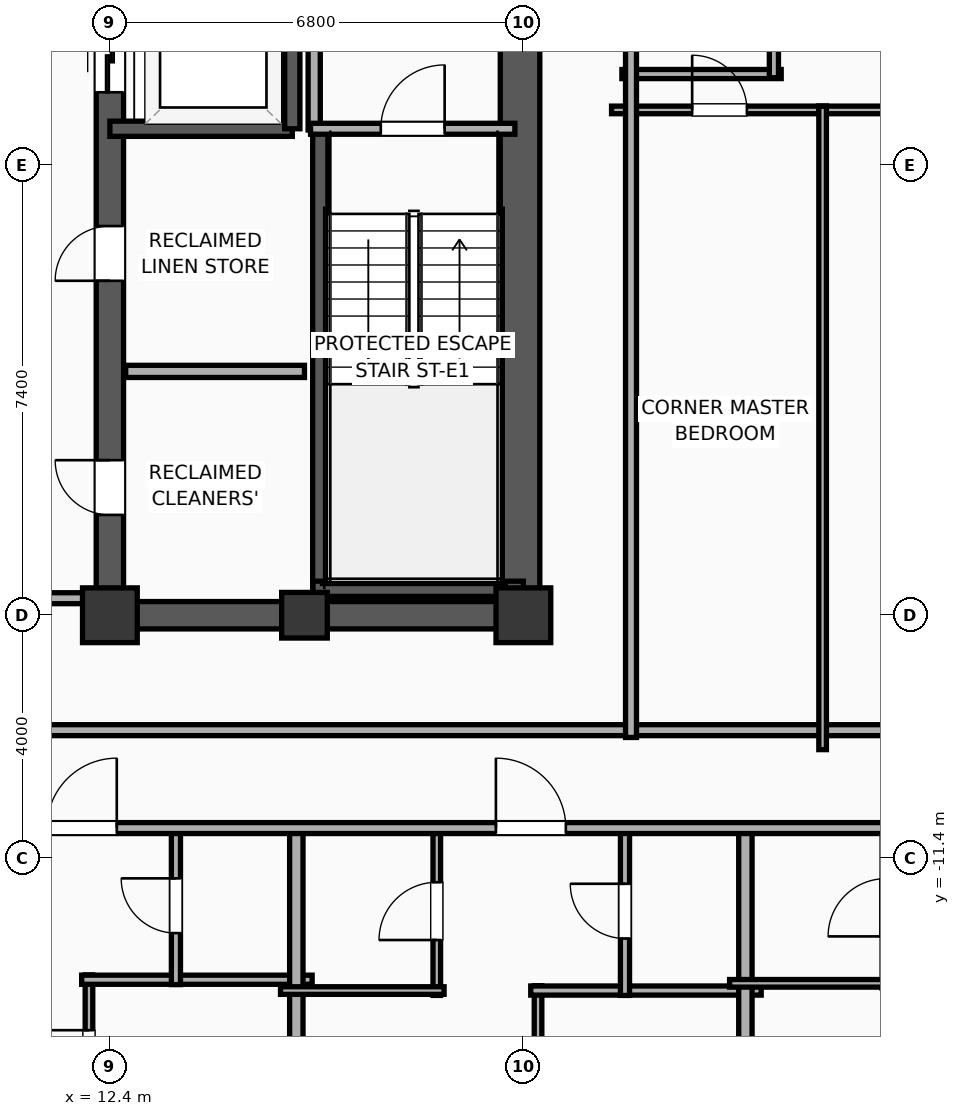
"""IFC4 building model, lengths in metres.
Left out: names, types, materials, properties, quantities, classifications, styles, units other than length and angle.
Written with IfcOpenShell. Run it as: python <this file> out.ifc"""

import sys

from ifc_helpers import new_model, si_unit, direction, frame, frame_2d, origin, origin_2d, place, context, subcontext, project, spatial, rectangle, extrude, element, fill, save


model = new_model("IFC4")
c1 = context("Model", 3, precision=1e-05, world=origin(), true_north=direction((0.0, 1.0)))
c2 = subcontext(c1, "Body", "Model", "MODEL_VIEW")
j1 = project(units=[si_unit("LENGTHUNIT", "METRE"), si_unit("PLANEANGLEUNIT", "RADIAN")], contexts=[c1])
p1 = place(None, origin())
s1 = spatial("IfcSite", under=j1, at=p1, CompositionType="ELEMENT")
p2 = place(p1, origin())
s2 = spatial("IfcBuilding", under=s1, at=p2, CompositionType="ELEMENT")
p3 = place(p2, frame((0.0, 0.0, 243.1)))
s3 = spatial("IfcBuildingStorey", under=s2, at=p3, CompositionType="ELEMENT", Elevation=243.1)
p4 = place(p3, frame((12.4, -7.4, 0.0), z_axis=(0.0, 0.0, 1.0), x_axis=(1.0, 0.0, 0.0)))
e1 = element("IfcColumn", 1, at=p4, inside=s3, PredefinedType="COLUMN", context=c2, shape_type="SweptSolid", body=[
    extrude(rectangle(XDim=0.9, YDim=0.9, at=origin_2d()), origin(), (0.0, 0.0, 1.0), 3.9),
])
p5 = place(p3, frame((15.6, -7.4, 0.0), z_axis=(0.0, 0.0, 1.0), x_axis=(1.0, 0.0, 0.0)))
e2 = element("IfcColumn", 2, at=p5, inside=s3, PredefinedType="COLUMN", context=c2, shape_type="SweptSolid", body=[
    extrude(rectangle(XDim=0.75, YDim=0.75, at=origin_2d()), origin(), (0.0, 0.0, 1.0), 3.9),
])
p6 = place(p3, frame((19.2, -7.4, 0.0), z_axis=(0.0, 0.0, 1.0), x_axis=(1.0, 0.0, 0.0)))
e3 = element("IfcColumn", 3, at=p6, inside=s3, PredefinedType="COLUMN", context=c2, shape_type="SweptSolid", body=[
    extrude(rectangle(XDim=0.9, YDim=0.9, at=origin_2d()), origin(), (0.0, 0.0, 1.0), 3.9),
])
p7 = place(p3, frame((12.175, -7.4, 0.0), z_axis=(0.0, 0.0, 1.0), x_axis=(1.0, 0.0, 0.0)))
e4 = element("IfcWall", 4, at=p7, inside=s3, PredefinedType="SHEAR", context=c2, shape_type="SweptSolid", body=[
    extrude(rectangle(XDim=7.25, YDim=0.45, at=frame_2d((3.625, 0.0))), origin(), (0.0, 0.0, 1.0), 3.65),
])
p8 = place(p3, frame((12.4, -7.4, 0.0), z_axis=(0.0, 0.0, 1.0), x_axis=(0.0, 1.0, 0.0)))
e5 = element("IfcWall", 5, at=p8, inside=s3, PredefinedType="SHEAR", context=c2, shape_type="SweptSolid", body=[
    extrude(rectangle(XDim=14.8, YDim=0.45, at=frame_2d((7.4, 0.0))), origin(), (0.0, 0.0, 1.0), 3.65),
])
p9 = place(p8, frame((8.6, 0.0, 0.0)))
e6 = element("IfcOpeningElement", 6, at=p9, cuts=e5, PredefinedType="OPENING", context=c2, shape_type="SweptSolid", body=[
    extrude(rectangle(XDim=1.1, YDim=2.05, at=frame_2d((0.55, 1.025))), frame((0.0, 0.235, 0.0), z_axis=(0.0, -1.0, 0.0), x_axis=(1.0, 0.0, 0.0)), (0.0, 0.0, 1.0), 0.47),
])
p10 = place(p8, frame((10.53, 0.0, 0.0)))
e7 = element("IfcOpeningElement", 7, at=p10, cuts=e5, PredefinedType="OPENING", context=c2, shape_type="SweptSolid", body=[
    extrude(rectangle(XDim=1.1, YDim=2.05, at=frame_2d((0.55, 1.025))), frame((0.0, 0.235, 0.0), z_axis=(0.0, -1.0, 0.0), x_axis=(1.0, 0.0, 0.0)), (0.0, 0.0, 1.0), 0.47),
])
p11 = place(p8, frame((1.65, 0.0, 0.0)))
e8 = element("IfcOpeningElement", 8, at=p11, cuts=e5, PredefinedType="OPENING", context=c2, shape_type="SweptSolid", body=[
    extrude(rectangle(XDim=0.9, YDim=2.05, at=frame_2d((0.45, 1.025))), frame((0.0, 0.235, 0.0), z_axis=(0.0, -1.0, 0.0), x_axis=(1.0, 0.0, 0.0)), (0.0, 0.0, 1.0), 0.47),
])
p12 = place(p8, frame((5.5, 0.0, 0.0)))
e9 = element("IfcOpeningElement", 9, at=p12, cuts=e5, PredefinedType="OPENING", context=c2, shape_type="SweptSolid", body=[
    extrude(rectangle(XDim=0.9, YDim=2.05, at=frame_2d((0.45, 1.025))), frame((0.0, 0.235, 0.0), z_axis=(0.0, -1.0, 0.0), x_axis=(1.0, 0.0, 0.0)), (0.0, 0.0, 1.0), 0.47),
])
p13 = place(p3, frame((19.145, -7.4, 0.0), z_axis=(0.0, 0.0, 1.0), x_axis=(0.0, 1.0, 0.0)))
e10 = element("IfcWall", 10, at=p13, inside=s3, PredefinedType="SHEAR", context=c2, shape_type="SweptSolid", body=[
    extrude(rectangle(XDim=14.8, YDim=0.65, at=frame_2d((7.4, 0.0))), origin(), (0.0, 0.0, 1.0), 3.65),
])
p14 = place(p3, frame((15.86, -7.085, 0.0), z_axis=(0.0, 0.0, 1.0), x_axis=(0.0, 1.0, 0.0)))
e11 = element("IfcWall", 11, at=p14, inside=s3, PredefinedType="SOLIDWALL", context=c2, shape_type="SweptSolid", body=[
    extrude(rectangle(XDim=7.685, YDim=0.25, at=frame_2d((3.843, 0.0))), origin(), (0.0, 0.0, 1.0), 3.65),
])
p15 = place(p3, frame((15.74, -6.965, 0.0), z_axis=(0.0, 0.0, 1.0), x_axis=(1.0, 0.0, 0.0)))
e12 = element("IfcWall", 12, at=p15, inside=s3, PredefinedType="SOLIDWALL", context=c2, shape_type="SweptSolid", body=[
    extrude(rectangle(XDim=3.46, YDim=0.25, at=frame_2d((1.73, 0.0))), origin(), (0.0, 0.0, 1.0), 3.65),
])
p16 = place(p3, frame((12.4, 0.6, 0.0), z_axis=(0.0, 0.0, 1.0), x_axis=(1.0, 0.0, 0.0)))
e13 = element("IfcWall", 13, at=p16, inside=s3, PredefinedType="SOLIDWALL", context=c2, shape_type="SweptSolid", body=[
    extrude(rectangle(XDim=3.0, YDim=0.25, at=frame_2d((1.5, 0.0))), origin(), (0.0, 0.0, 1.0), 3.65),
])
p17 = place(p3, frame((15.4, 0.6, 0.0), z_axis=(0.0, 0.0, 1.0), x_axis=(0.0, 1.0, 0.0)))
e14 = element("IfcWall", 14, at=p17, inside=s3, PredefinedType="SOLIDWALL", context=c2, shape_type="SweptSolid", body=[
    extrude(rectangle(XDim=2.3, YDim=0.25, at=frame_2d((1.15, 0.0))), origin(), (0.0, 0.0, 1.0), 3.65),
])
p18 = place(p3, frame((15.76, 0.58, 0.0), z_axis=(0.0, 0.0, 1.0), x_axis=(0.0, 1.0, 0.0)))
e15 = element("IfcWall", 15, at=p18, inside=s3, PredefinedType="PARTITIONING", context=c2, shape_type="SweptSolid", body=[
    extrude(rectangle(XDim=2.52, YDim=0.2, at=frame_2d((1.26, 0.0))), origin(), (0.0, 0.0, 1.0), 3.65),
])
p19 = place(p3, frame((15.7, 0.6, 0.0), z_axis=(0.0, 0.0, 1.0), x_axis=(1.0, 0.0, 0.0)))
e16 = element("IfcWall", 16, at=p19, inside=s3, PredefinedType="PARTITIONING", context=c2, shape_type="SweptSolid", body=[
    extrude(rectangle(XDim=3.36, YDim=0.18, at=frame_2d((1.68, 0.0))), origin(), (0.0, 0.0, 1.0), 3.65),
])
p20 = place(p19, frame((1.155, 0.0, 0.0)))
e17 = element("IfcOpeningElement", 17, at=p20, cuts=e16, PredefinedType="OPENING", context=c2, shape_type="SweptSolid", body=[
    extrude(rectangle(XDim=1.05, YDim=2.05, at=frame_2d((0.525, 1.025))), frame((0.0, 0.1, 0.0), z_axis=(0.0, -1.0, 0.0), x_axis=(1.0, 0.0, 0.0)), (0.0, 0.0, 1.0), 0.2),
])
p21 = place(p3, frame((12.66, -3.39, 0.0), z_axis=(0.0, 0.0, 1.0), x_axis=(1.0, 0.0, 0.0)))
e18 = element("IfcWall", 18, at=p21, inside=s3, PredefinedType="PARTITIONING", context=c2, shape_type="SweptSolid", body=[
    extrude(rectangle(XDim=2.94, YDim=0.2, at=frame_2d((1.47, 0.0))), origin(), (0.0, 0.0, 1.0), 3.65),
])
p22 = place(p3, frame((9.88, -7.12, 0.0), z_axis=(0.0, 0.0, 1.0), x_axis=(1.0, 0.0, 0.0)))
e19 = element("IfcWall", 19, at=p22, inside=s3, PredefinedType="PARTITIONING", context=c2, shape_type="SweptSolid", body=[
    extrude(rectangle(XDim=2.27, YDim=0.18, at=frame_2d((1.135, 0.0))), origin(), (0.0, 0.0, 1.0), 3.65),
])
p23 = place(p3, frame((9.88, -9.29, 0.0), z_axis=(0.0, 0.0, 1.0), x_axis=(1.0, 0.0, 0.0)))
e20 = element("IfcWall", 20, at=p23, inside=s3, PredefinedType="PARTITIONING", context=c2, shape_type="SweptSolid", body=[
    extrude(rectangle(XDim=20.35, YDim=0.18, at=frame_2d((10.175, 0.0))), origin(), (0.0, 0.0, 1.0), 3.65),
])
p24 = place(p3, frame((12.056, -18.98, 0.0), z_axis=(0.0, 0.0, 1.0), x_axis=(0.0, 1.0, 0.0)))
e21 = element("IfcWall", 21, at=p24, inside=s3, PredefinedType="PARTITIONING", context=c2, shape_type="SweptSolid", body=[
    extrude(rectangle(XDim=5.666, YDim=0.125, at=frame_2d((2.833, 0.0))), origin(), (0.0, 0.0, 1.0), 3.65),
])
p25 = place(p24, frame((3.856, 0.0, 0.0)))
e22 = element("IfcOpeningElement", 22, at=p25, cuts=e21, PredefinedType="OPENING", context=c2, shape_type="SweptSolid", body=[
    extrude(rectangle(XDim=0.9, YDim=2.05, at=frame_2d((0.45, 1.025))), frame((0.0, 0.073, 0.0), z_axis=(0.0, -1.0, 0.0), x_axis=(1.0, 0.0, 0.0)), (0.0, 0.0, 1.0), 0.145),
])
p26 = place(p3, frame((11.936, -13.394, 0.0), z_axis=(0.0, 0.0, 1.0), x_axis=(1.0, 0.0, 0.0)))
e23 = element("IfcWall", 23, at=p26, inside=s3, PredefinedType="PLUMBINGWALL", context=c2, shape_type="SweptSolid", body=[
    extrude(rectangle(XDim=3.79, YDim=0.15, at=frame_2d((1.895, 0.0))), origin(), (0.0, 0.0, 1.0), 3.65),
])
p27 = place(p3, frame((13.486, -13.474, 0.0), z_axis=(0.0, 0.0, 1.0), x_axis=(0.0, 1.0, 0.0)))
e24 = element("IfcWall", 24, at=p27, inside=s3, PredefinedType="PLUMBINGWALL", context=c2, shape_type="SweptSolid", body=[
    extrude(rectangle(XDim=2.594, YDim=0.15, at=frame_2d((1.297, 0.0))), origin(), (0.0, 0.0, 1.0), 3.65),
])
p28 = place(p27, frame((0.847, 0.0, 0.0)))
e25 = element("IfcOpeningElement", 25, at=p28, cuts=e24, PredefinedType="OPENING", context=c2, shape_type="SweptSolid", body=[
    extrude(rectangle(XDim=0.9, YDim=2.05, at=frame_2d((0.45, 1.025))), frame((0.0, 0.085, 0.0), z_axis=(0.0, -1.0, 0.0), x_axis=(1.0, 0.0, 0.0)), (0.0, 0.0, 1.0), 0.17),
])
p29 = place(p3, frame((15.466, -18.83, 0.0), z_axis=(0.0, 0.0, 1.0), x_axis=(0.0, 1.0, 0.0)))
e26 = element("IfcWall", 26, at=p29, inside=s3, PredefinedType="PARTITIONING", context=c2, shape_type="SweptSolid", body=[
    extrude(rectangle(XDim=8.01, YDim=0.22, at=frame_2d((4.005, 0.0))), origin(), (0.0, 0.0, 1.0), 3.65),
])
p30 = place(p3, frame((19.441, -18.98, 0.0), z_axis=(0.0, 0.0, 1.0), x_axis=(0.0, 1.0, 0.0)))
e27 = element("IfcWall", 27, at=p30, inside=s3, PredefinedType="PARTITIONING", context=c2, shape_type="SweptSolid", body=[
    extrude(rectangle(XDim=5.488, YDim=0.125, at=frame_2d((2.744, 0.0))), origin(), (0.0, 0.0, 1.0), 3.65),
])
p31 = place(p30, frame((3.721, 0.0, 0.0)))
e28 = element("IfcOpeningElement", 28, at=p31, cuts=e27, PredefinedType="OPENING", context=c2, shape_type="SweptSolid", body=[
    extrude(rectangle(XDim=0.9, YDim=2.05, at=frame_2d((0.45, 1.025))), frame((0.0, 0.073, 0.0), z_axis=(0.0, -1.0, 0.0), x_axis=(1.0, 0.0, 0.0)), (0.0, 0.0, 1.0), 0.145),
])
p32 = place(p3, frame((19.321, -13.572, 0.0), z_axis=(0.0, 0.0, 1.0), x_axis=(1.0, 0.0, 0.0)))
e29 = element("IfcWall", 29, at=p32, inside=s3, PredefinedType="PLUMBINGWALL", context=c2, shape_type="SweptSolid", body=[
    extrude(rectangle(XDim=3.79, YDim=0.15, at=frame_2d((1.895, 0.0))), origin(), (0.0, 0.0, 1.0), 3.65),
])
p33 = place(p3, frame((17.776, -13.652, 0.0), z_axis=(0.0, 0.0, 1.0), x_axis=(0.0, 1.0, 0.0)))
e30 = element("IfcWall", 30, at=p33, inside=s3, PredefinedType="PARTITIONING", context=c2, shape_type="SweptSolid", body=[
    extrude(rectangle(XDim=2.772, YDim=0.125, at=frame_2d((1.386, 0.0))), origin(), (0.0, 0.0, 1.0), 3.65),
])
p34 = place(p33, frame((0.911, 0.0, 0.0)))
e31 = element("IfcOpeningElement", 31, at=p34, cuts=e30, PredefinedType="OPENING", context=c2, shape_type="SweptSolid", body=[
    extrude(rectangle(XDim=0.95, YDim=2.05, at=frame_2d((0.475, 1.025))), frame((0.0, 0.073, 0.0), z_axis=(0.0, -1.0, 0.0), x_axis=(1.0, 0.0, 0.0)), (0.0, 0.0, 1.0), 0.145),
])
p35 = place(p3, frame((15.206, -13.572, 0.0), z_axis=(0.0, 0.0, 1.0), x_axis=(1.0, 0.0, 0.0)))
e32 = element("IfcWall", 32, at=p35, inside=s3, PredefinedType="PARTITIONING", context=c2, shape_type="SweptSolid", body=[
    extrude(rectangle(XDim=2.69, YDim=0.125, at=frame_2d((1.345, 0.0))), origin(), (0.0, 0.0, 1.0), 3.65),
])
p36 = place(p3, frame((20.871, -13.652, 0.0), z_axis=(0.0, 0.0, 1.0), x_axis=(0.0, 1.0, 0.0)))
e33 = element("IfcWall", 33, at=p36, inside=s3, PredefinedType="PLUMBINGWALL", context=c2, shape_type="SweptSolid", body=[
    extrude(rectangle(XDim=2.772, YDim=0.15, at=frame_2d((1.386, 0.0))), origin(), (0.0, 0.0, 1.0), 3.65),
])
p37 = place(p36, frame((0.936, 0.0, 0.0)))
e34 = element("IfcOpeningElement", 34, at=p37, cuts=e33, PredefinedType="OPENING", context=c2, shape_type="SweptSolid", body=[
    extrude(rectangle(XDim=0.9, YDim=2.05, at=frame_2d((0.45, 1.025))), frame((0.0, 0.085, 0.0), z_axis=(0.0, -1.0, 0.0), x_axis=(1.0, 0.0, 0.0)), (0.0, 0.0, 1.0), 0.17),
])
p38 = place(p3, frame((22.851, -18.83, 0.0), z_axis=(0.0, 0.0, 1.0), x_axis=(0.0, 1.0, 0.0)))
e35 = element("IfcWall", 35, at=p38, inside=s3, PredefinedType="PARTITIONING", context=c2, shape_type="SweptSolid", body=[
    extrude(rectangle(XDim=8.01, YDim=0.22, at=frame_2d((4.005, 0.0))), origin(), (0.0, 0.0, 1.0), 3.65),
])
p39 = place(p3, frame((22.591, -13.453, 0.0), z_axis=(0.0, 0.0, 1.0), x_axis=(1.0, 0.0, 0.0)))
e36 = element("IfcWall", 36, at=p39, inside=s3, PredefinedType="PARTITIONING", context=c2, shape_type="SweptSolid", body=[
    extrude(rectangle(XDim=2.69, YDim=0.125, at=frame_2d((1.345, 0.0))), origin(), (0.0, 0.0, 1.0), 3.65),
])
p40 = place(p3, frame((8.08, -10.9, 0.0), z_axis=(0.0, 0.0, 1.0), x_axis=(1.0, 0.0, 0.0)))
e37 = element("IfcWall", 37, at=p40, inside=s3, PredefinedType="PARTITIONING", context=c2, shape_type="SweptSolid", body=[
    extrude(rectangle(XDim=22.15, YDim=0.18, at=frame_2d((11.075, 0.0))), origin(), (0.0, 0.0, 1.0), 3.65),
])
p41 = place(p40, frame((3.283, 0.0, 0.0)))
e38 = element("IfcOpeningElement", 38, at=p41, cuts=e37, PredefinedType="OPENING", context=c2, shape_type="SweptSolid", body=[
    extrude(rectangle(XDim=1.15, YDim=2.05, at=frame_2d((0.575, 1.025))), frame((0.0, 0.1, 0.0), z_axis=(0.0, -1.0, 0.0), x_axis=(1.0, 0.0, 0.0)), (0.0, 0.0, 1.0), 0.2),
])
p42 = place(p40, frame((10.668, 0.0, 0.0)))
e39 = element("IfcOpeningElement", 39, at=p42, cuts=e37, PredefinedType="OPENING", context=c2, shape_type="SweptSolid", body=[
    extrude(rectangle(XDim=1.15, YDim=2.05, at=frame_2d((0.575, 1.025))), frame((0.0, 0.1, 0.0), z_axis=(0.0, -1.0, 0.0), x_axis=(1.0, 0.0, 0.0)), (0.0, 0.0, 1.0), 0.2),
])
p43 = place(p40, frame((18.084, 0.0, 0.0)))
e40 = element("IfcOpeningElement", 40, at=p43, cuts=e37, PredefinedType="OPENING", context=c2, shape_type="SweptSolid", body=[
    extrude(rectangle(XDim=1.15, YDim=2.05, at=frame_2d((0.575, 1.025))), frame((0.0, 0.1, 0.0), z_axis=(0.0, -1.0, 0.0), x_axis=(1.0, 0.0, 0.0)), (0.0, 0.0, 1.0), 0.2),
])
p44 = place(p3, frame((20.82, 1.5, 0.0), z_axis=(0.0, 0.0, 1.0), x_axis=(1.0, 0.0, 0.0)))
e41 = element("IfcWall", 41, at=p44, inside=s3, PredefinedType="PLUMBINGWALL", context=c2, shape_type="SweptSolid", body=[
    extrude(rectangle(XDim=2.62, YDim=0.15, at=frame_2d((1.31, 0.0))), origin(), (0.0, 0.0, 1.0), 3.65),
])
p45 = place(p3, frame((23.32, 1.44, 0.0), z_axis=(0.0, 0.0, 1.0), x_axis=(0.0, 1.0, 0.0)))
e42 = element("IfcWall", 42, at=p45, inside=s3, PredefinedType="PLUMBINGWALL", context=c2, shape_type="SweptSolid", body=[
    extrude(rectangle(XDim=3.12, YDim=0.15, at=frame_2d((1.56, 0.0))), origin(), (0.0, 0.0, 1.0), 3.65),
])
p46 = place(p45, frame((1.11, 0.0, 0.0)))
e43 = element("IfcOpeningElement", 43, at=p46, cuts=e42, PredefinedType="OPENING", context=c2, shape_type="SweptSolid", body=[
    extrude(rectangle(XDim=0.9, YDim=2.05, at=frame_2d((0.45, 1.025))), frame((0.0, 0.085, 0.0), z_axis=(0.0, -1.0, 0.0), x_axis=(1.0, 0.0, 0.0)), (0.0, 0.0, 1.0), 0.17),
])
p47 = place(p3, frame((20.65, 0.91, 0.0), z_axis=(0.0, 0.0, 1.0), x_axis=(1.0, 0.0, 0.0)))
e44 = element("IfcWall", 44, at=p47, inside=s3, PredefinedType="PARTITIONING", context=c2, shape_type="SweptSolid", body=[
    extrude(rectangle(XDim=3.534, YDim=0.125, at=frame_2d((1.767, 0.0))), origin(), (0.0, 0.0, 1.0), 3.65),
])
p48 = place(p47, frame((1.325, 0.0, 0.0)))
e45 = element("IfcOpeningElement", 45, at=p48, cuts=e44, PredefinedType="OPENING", context=c2, shape_type="SweptSolid", body=[
    extrude(rectangle(XDim=0.9, YDim=2.05, at=frame_2d((0.45, 1.025))), frame((0.0, 0.073, 0.0), z_axis=(0.0, -1.0, 0.0), x_axis=(1.0, 0.0, 0.0)), (0.0, 0.0, 1.0), 0.145),
])
p49 = place(p3, frame((24.059, 0.91, 0.0), z_axis=(0.0, 0.0, 1.0), x_axis=(1.0, 0.0, 0.0)))
e46 = element("IfcWall", 46, at=p49, inside=s3, PredefinedType="PARTITIONING", context=c2, shape_type="SweptSolid", body=[
    extrude(rectangle(XDim=3.183, YDim=0.125, at=frame_2d((1.591, 0.0))), origin(), (0.0, 0.0, 1.0), 3.65),
])
p50 = place(p49, frame((1.142, 0.0, 0.0)))
e47 = element("IfcOpeningElement", 47, at=p50, cuts=e46, PredefinedType="OPENING", context=c2, shape_type="SweptSolid", body=[
    extrude(rectangle(XDim=0.9, YDim=2.05, at=frame_2d((0.45, 1.025))), frame((0.0, 0.073, 0.0), z_axis=(0.0, -1.0, 0.0), x_axis=(1.0, 0.0, 0.0)), (0.0, 0.0, 1.0), 0.145),
])
p51 = place(p3, frame((24.121, -9.61, 0.0), z_axis=(0.0, 0.0, 1.0), x_axis=(0.0, 1.0, 0.0)))
e48 = element("IfcWall", 48, at=p51, inside=s3, PredefinedType="PARTITIONING", context=c2, shape_type="SweptSolid", body=[
    extrude(rectangle(XDim=10.58, YDim=0.125, at=frame_2d((5.29, 0.0))), origin(), (0.0, 0.0, 1.0), 3.65),
])
p52 = place(p3, frame((20.97, -9.41, 0.0), z_axis=(0.0, 0.0, 1.0), x_axis=(0.0, 1.0, 0.0)))
e49 = element("IfcWall", 49, at=p52, inside=s3, PredefinedType="PARTITIONING", context=c2, shape_type="SweptSolid", body=[
    extrude(rectangle(XDim=18.82, YDim=0.18, at=frame_2d((9.41, 0.0))), origin(), (0.0, 0.0, 1.0), 3.65),
])
p53 = place(p9, origin())
e50 = element("IfcDoor", 50, at=p53, inside=s3, OperationType="SLIDING_TO_LEFT", PredefinedType="DOOR", context=c2, shape_type="SweptSolid", body=[
    extrude(rectangle(XDim=1.1, YDim=2.05, at=frame_2d((0.55, 1.025))), frame((0.0, 0.025, 0.0), z_axis=(0.0, -1.0, 0.0), x_axis=(1.0, 0.0, 0.0)), (0.0, 0.0, 1.0), 0.05),
])
fill(e6, e50)
p54 = place(p20, origin())
e51 = element("IfcDoor", 51, at=p54, inside=s3, OperationType="SINGLE_SWING_RIGHT", PredefinedType="DOOR", context=c2, shape_type="SweptSolid", body=[
    extrude(rectangle(XDim=1.05, YDim=2.05, at=frame_2d((0.525, 1.025))), frame((0.0, 0.025, 0.0), z_axis=(0.0, -1.0, 0.0), x_axis=(1.0, 0.0, 0.0)), (0.0, 0.0, 1.0), 0.05),
])
fill(e17, e51)
p55 = place(p25, origin())
e52 = element("IfcDoor", 52, at=p55, inside=s3, OperationType="SINGLE_SWING_RIGHT", PredefinedType="DOOR", context=c2, shape_type="SweptSolid", body=[
    extrude(rectangle(XDim=0.9, YDim=2.05, at=frame_2d((0.45, 1.025))), frame((0.0, 0.025, 0.0), z_axis=(0.0, -1.0, 0.0), x_axis=(1.0, 0.0, 0.0)), (0.0, 0.0, 1.0), 0.05),
])
fill(e22, e52)
p56 = place(p28, origin())
e53 = element("IfcDoor", 53, at=p56, inside=s3, OperationType="SINGLE_SWING_RIGHT", PredefinedType="DOOR", context=c2, shape_type="SweptSolid", body=[
    extrude(rectangle(XDim=0.9, YDim=2.05, at=frame_2d((0.45, 1.025))), frame((0.0, 0.025, 0.0), z_axis=(0.0, -1.0, 0.0), x_axis=(1.0, 0.0, 0.0)), (0.0, 0.0, 1.0), 0.05),
])
fill(e25, e53)
p57 = place(p34, origin())
e54 = element("IfcDoor", 54, at=p57, inside=s3, OperationType="SINGLE_SWING_LEFT", PredefinedType="DOOR", context=c2, shape_type="SweptSolid", body=[
    extrude(rectangle(XDim=0.95, YDim=2.05, at=frame_2d((0.475, 1.025))), frame((0.0, 0.025, 0.0), z_axis=(0.0, -1.0, 0.0), x_axis=(1.0, 0.0, 0.0)), (0.0, 0.0, 1.0), 0.05),
])
fill(e31, e54)
p58 = place(p37, origin())
e55 = element("IfcDoor", 55, at=p58, inside=s3, OperationType="SINGLE_SWING_RIGHT", PredefinedType="DOOR", context=c2, shape_type="SweptSolid", body=[
    extrude(rectangle(XDim=0.9, YDim=2.05, at=frame_2d((0.45, 1.025))), frame((0.0, 0.025, 0.0), z_axis=(0.0, -1.0, 0.0), x_axis=(1.0, 0.0, 0.0)), (0.0, 0.0, 1.0), 0.05),
])
fill(e34, e55)
p59 = place(p41, origin())
e56 = element("IfcDoor", 56, at=p59, inside=s3, OperationType="SINGLE_SWING_RIGHT", PredefinedType="DOOR", context=c2, shape_type="SweptSolid", body=[
    extrude(rectangle(XDim=1.15, YDim=2.05, at=frame_2d((0.575, 1.025))), frame((0.0, 0.025, 0.0), z_axis=(0.0, -1.0, 0.0), x_axis=(1.0, 0.0, 0.0)), (0.0, 0.0, 1.0), 0.05),
])
fill(e38, e56)
p60 = place(p42, origin())
e57 = element("IfcDoor", 57, at=p60, inside=s3, OperationType="SINGLE_SWING_LEFT", PredefinedType="DOOR", context=c2, shape_type="SweptSolid", body=[
    extrude(rectangle(XDim=1.15, YDim=2.05, at=frame_2d((0.575, 1.025))), frame((0.0, 0.025, 0.0), z_axis=(0.0, -1.0, 0.0), x_axis=(1.0, 0.0, 0.0)), (0.0, 0.0, 1.0), 0.05),
])
fill(e39, e57)
p61 = place(p48, origin())
e58 = element("IfcDoor", 58, at=p61, inside=s3, OperationType="SINGLE_SWING_LEFT", PredefinedType="DOOR", context=c2, shape_type="SweptSolid", body=[
    extrude(rectangle(XDim=0.9, YDim=2.05, at=frame_2d((0.45, 1.025))), frame((0.0, 0.025, 0.0), z_axis=(0.0, -1.0, 0.0), x_axis=(1.0, 0.0, 0.0)), (0.0, 0.0, 1.0), 0.05),
])
fill(e45, e58)
p62 = place(p11, origin())
e59 = element("IfcDoor", 59, at=p62, inside=s3, OperationType="SINGLE_SWING_RIGHT", PredefinedType="DOOR", context=c2, shape_type="SweptSolid", body=[
    extrude(rectangle(XDim=0.9, YDim=2.05, at=frame_2d((0.45, 1.025))), frame((0.0, 0.025, 0.0), z_axis=(0.0, -1.0, 0.0), x_axis=(1.0, 0.0, 0.0)), (0.0, 0.0, 1.0), 0.05),
])
fill(e8, e59)
p63 = place(p12, origin())
e60 = element("IfcDoor", 60, at=p63, inside=s3, OperationType="SINGLE_SWING_LEFT", PredefinedType="DOOR", context=c2, shape_type="SweptSolid", body=[
    extrude(rectangle(XDim=0.9, YDim=2.05, at=frame_2d((0.45, 1.025))), frame((0.0, 0.025, 0.0), z_axis=(0.0, -1.0, 0.0), x_axis=(1.0, 0.0, 0.0)), (0.0, 0.0, 1.0), 0.05),
])
fill(e9, e60)
save(model, sys.argv[1])
